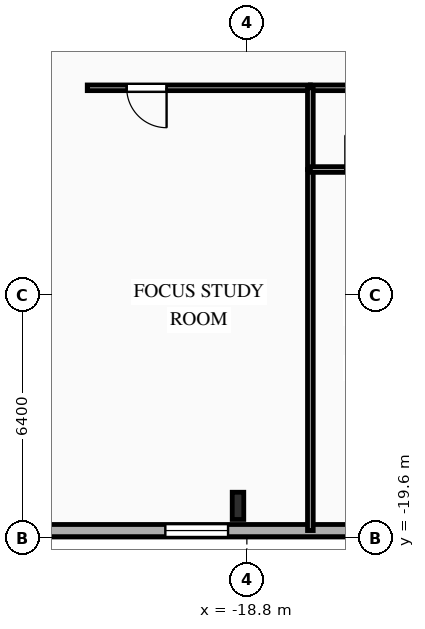
"""IFC4 building model, lengths in metres.
Left out: names, types, materials, properties, quantities, classifications, styles, units other than length and angle.
Written with IfcOpenShell. Run it as: python <this file> out.ifc"""

import sys

from ifc_helpers import new_model, si_unit, direction, frame, frame_2d, origin, origin_2d, place, context, subcontext, project, spatial, rectangle, i_section, extrude, element, fill, save


model = new_model("IFC4")
c1 = context("Model", 3, precision=1e-05, world=origin(), true_north=direction((0.0, 1.0)))
c2 = subcontext(c1, "Body", "Model", "MODEL_VIEW")
j1 = project(units=[si_unit("LENGTHUNIT", "METRE"), si_unit("PLANEANGLEUNIT", "RADIAN")], contexts=[c1])
p1 = place(None, origin())
s1 = spatial("IfcSite", under=j1, at=p1, CompositionType="ELEMENT")
p2 = place(p1, origin())
s2 = spatial("IfcBuilding", under=s1, at=p2, CompositionType="ELEMENT")
p3 = place(p2, frame((0.0, 0.0, 60.5)))
s3 = spatial("IfcBuildingStorey", under=s2, at=p3, CompositionType="ELEMENT", Elevation=60.5)
p4 = place(p3, frame((-19.033, -18.75, 0.0), z_axis=(0.0, 0.0, 1.0), x_axis=(1.0, 0.0, 0.0)))
e1 = element("IfcColumn", 1, at=p4, inside=s3, PredefinedType="COLUMN", context=c2, shape_type="SweptSolid", body=[
    extrude(i_section(OverallWidth=0.304, OverallDepth=0.716, WebThickness=0.021, FlangeThickness=0.04, FilletRadius=0.027, at=origin_2d()), origin(), (0.0, 0.0, 1.0), 3.35),
])
p5 = place(p3, frame((29.2, -19.4, 0.0), z_axis=(0.0, 0.0, 1.0), x_axis=(-1.0, 0.0, 0.0)))
e2 = element("IfcWall", 2, at=p5, inside=s3, PredefinedType="SOLIDWALL", context=c2, shape_type="SweptSolid", body=[
    extrude(rectangle(XDim=58.4, YDim=0.32, at=frame_2d((29.2, 0.0))), origin(), (0.0, 0.0, 1.0), 3.035),
])
p6 = place(p5, frame((7.215, 0.0, 0.85)))
e3 = element("IfcOpeningElement", 3, at=p6, cuts=e2, PredefinedType="OPENING", context=c2, shape_type="SweptSolid", body=[
    extrude(rectangle(XDim=1.65, YDim=1.85, at=frame_2d((0.825, 0.925))), frame((0.0, 0.17, 0.0), z_axis=(0.0, -1.0, 0.0), x_axis=(1.0, 0.0, 0.0)), (0.0, 0.0, 1.0), 0.34),
])
p7 = place(p5, frame((10.855, 0.0, 0.85)))
e4 = element("IfcOpeningElement", 4, at=p7, cuts=e2, PredefinedType="OPENING", context=c2, shape_type="SweptSolid", body=[
    extrude(rectangle(XDim=1.65, YDim=1.85, at=frame_2d((0.825, 0.925))), frame((0.0, 0.17, 0.0), z_axis=(0.0, -1.0, 0.0), x_axis=(1.0, 0.0, 0.0)), (0.0, 0.0, 1.0), 0.34),
])
p8 = place(p5, frame((15.7, 0.0, 0.85)))
e5 = element("IfcOpeningElement", 5, at=p8, cuts=e2, PredefinedType="OPENING", context=c2, shape_type="SweptSolid", body=[
    extrude(rectangle(XDim=2.2, YDim=1.85, at=frame_2d((1.1, 0.925))), frame((0.0, 0.17, 0.0), z_axis=(0.0, -1.0, 0.0), x_axis=(1.0, 0.0, 0.0)), (0.0, 0.0, 1.0), 0.34),
])
p9 = place(p5, frame((22.26, 0.0, 0.85)))
e6 = element("IfcOpeningElement", 6, at=p9, cuts=e2, PredefinedType="OPENING", context=c2, shape_type="SweptSolid", body=[
    extrude(rectangle(XDim=2.2, YDim=1.85, at=frame_2d((1.1, 0.925))), frame((0.0, 0.17, 0.0), z_axis=(0.0, -1.0, 0.0), x_axis=(1.0, 0.0, 0.0)), (0.0, 0.0, 1.0), 0.34),
])
p10 = place(p5, frame((29.408, 0.0, 0.85)))
e7 = element("IfcOpeningElement", 7, at=p10, cuts=e2, PredefinedType="OPENING", context=c2, shape_type="SweptSolid", body=[
    extrude(rectangle(XDim=2.2, YDim=1.85, at=frame_2d((1.1, 0.925))), frame((0.0, 0.17, 0.0), z_axis=(0.0, -1.0, 0.0), x_axis=(1.0, 0.0, 0.0)), (0.0, 0.0, 1.0), 0.34),
])
p11 = place(p5, frame((35.38, 0.0, 0.85)))
e8 = element("IfcOpeningElement", 8, at=p11, cuts=e2, PredefinedType="OPENING", context=c2, shape_type="SweptSolid", body=[
    extrude(rectangle(XDim=2.2, YDim=1.85, at=frame_2d((1.1, 0.925))), frame((0.0, 0.17, 0.0), z_axis=(0.0, -1.0, 0.0), x_axis=(1.0, 0.0, 0.0)), (0.0, 0.0, 1.0), 0.34),
])
p12 = place(p5, frame((41.98, 0.0, 0.85)))
e9 = element("IfcOpeningElement", 9, at=p12, cuts=e2, PredefinedType="OPENING", context=c2, shape_type="SweptSolid", body=[
    extrude(rectangle(XDim=2.2, YDim=1.85, at=frame_2d((1.1, 0.925))), frame((0.0, 0.17, 0.0), z_axis=(0.0, -1.0, 0.0), x_axis=(1.0, 0.0, 0.0)), (0.0, 0.0, 1.0), 0.34),
])
p13 = place(p5, frame((48.495, 0.0, 0.85)))
e10 = element("IfcOpeningElement", 10, at=p13, cuts=e2, PredefinedType="OPENING", context=c2, shape_type="SweptSolid", body=[
    extrude(rectangle(XDim=1.65, YDim=1.85, at=frame_2d((0.825, 0.925))), frame((0.0, 0.17, 0.0), z_axis=(0.0, -1.0, 0.0), x_axis=(1.0, 0.0, 0.0)), (0.0, 0.0, 1.0), 0.34),
])
p14 = place(p3, frame((-17.129, -7.75, 0.0), z_axis=(0.0, 0.0, 1.0), x_axis=(-1.0, 0.0, 0.0)))
e11 = element("IfcWall", 11, at=p14, inside=s3, PredefinedType="PARTITIONING", context=c2, shape_type="SweptSolid", body=[
    extrude(rectangle(XDim=5.871, YDim=0.15, at=frame_2d((2.936, 0.0))), origin(), (0.0, 0.0, 1.0), 3.035),
])
p15 = place(p14, frame((3.783, 0.0, 0.0)))
e12 = element("IfcOpeningElement", 12, at=p15, cuts=e11, PredefinedType="OPENING", context=c2, shape_type="SweptSolid", body=[
    extrude(rectangle(XDim=1.05, YDim=2.15, at=frame_2d((0.525, 1.075))), frame((0.0, 0.085, 0.0), z_axis=(0.0, -1.0, 0.0), x_axis=(1.0, 0.0, 0.0)), (0.0, 0.0, 1.0), 0.17),
])
p16 = place(p3, frame((-14.679, -7.75, 0.0), z_axis=(0.0, 0.0, 1.0), x_axis=(-1.0, 0.0, 0.0)))
e13 = element("IfcWall", 13, at=p16, inside=s3, PredefinedType="PLUMBINGWALL", context=c2, shape_type="SweptSolid", body=[
    extrude(rectangle(XDim=2.45, YDim=0.15, at=frame_2d((1.225, 0.0))), origin(), (0.0, 0.0, 1.0), 3.035),
])
p17 = place(p3, frame((-17.129, -9.9, 0.0), z_axis=(0.0, 0.0, 1.0), x_axis=(0.0, -1.0, 0.0)))
e14 = element("IfcWall", 14, at=p17, inside=s3, PredefinedType="PARTITIONING", context=c2, shape_type="SweptSolid", body=[
    extrude(rectangle(XDim=9.5, YDim=0.15, at=frame_2d((4.75, 0.0))), origin(), (0.0, 0.0, 1.0), 3.035),
])
p18 = place(p3, frame((-17.129, -7.75, 0.0), z_axis=(0.0, 0.0, 1.0), x_axis=(0.0, -1.0, 0.0)))
e15 = element("IfcWall", 15, at=p18, inside=s3, PredefinedType="PLUMBINGWALL", context=c2, shape_type="SweptSolid", body=[
    extrude(rectangle(XDim=2.15, YDim=0.15, at=frame_2d((1.075, 0.0))), origin(), (0.0, 0.0, 1.0), 3.035),
])
p19 = place(p3, frame((-17.129, -9.9, 0.0), z_axis=(0.0, 0.0, 1.0), x_axis=(1.0, 0.0, 0.0)))
e16 = element("IfcWall", 16, at=p19, inside=s3, PredefinedType="PLUMBINGWALL", context=c2, shape_type="SweptSolid", body=[
    extrude(rectangle(XDim=2.45, YDim=0.15, at=frame_2d((1.225, 0.0))), origin(), (0.0, 0.0, 1.0), 3.035),
])
p20 = place(p19, frame((0.921, 0.0, 0.0)))
e17 = element("IfcOpeningElement", 17, at=p20, cuts=e16, PredefinedType="OPENING", context=c2, shape_type="SweptSolid", body=[
    extrude(rectangle(XDim=0.9, YDim=2.1, at=frame_2d((0.45, 1.05))), frame((0.0, 0.085, 0.0), z_axis=(0.0, -1.0, 0.0), x_axis=(1.0, 0.0, 0.0)), (0.0, 0.0, 1.0), 0.17),
])
p21 = place(p13, origin())
e18 = element("IfcWindow", 18, at=p21, inside=s3, PartitioningType="SINGLE_PANEL", PredefinedType="WINDOW", context=c2, shape_type="SweptSolid", body=[
    extrude(rectangle(XDim=1.65, YDim=1.85, at=frame_2d((0.825, 0.925))), frame((0.0, 0.03, 0.0), z_axis=(0.0, -1.0, 0.0), x_axis=(1.0, 0.0, 0.0)), (0.0, 0.0, 1.0), 0.06),
])
fill(e10, e18)
p22 = place(p15, origin())
e19 = element("IfcDoor", 19, at=p22, inside=s3, OperationType="SINGLE_SWING_LEFT", PredefinedType="DOOR", context=c2, shape_type="SweptSolid", body=[
    extrude(rectangle(XDim=1.05, YDim=2.15, at=frame_2d((0.525, 1.075))), frame((0.0, 0.025, 0.0), z_axis=(0.0, -1.0, 0.0), x_axis=(1.0, 0.0, 0.0)), (0.0, 0.0, 1.0), 0.05),
])
fill(e12, e19)
p23 = place(p20, origin())
e20 = element("IfcDoor", 20, at=p23, inside=s3, OperationType="SINGLE_SWING_LEFT", PredefinedType="DOOR", context=c2, shape_type="SweptSolid", body=[
    extrude(rectangle(XDim=0.9, YDim=2.1, at=frame_2d((0.45, 1.05))), frame((0.0, 0.025, 0.0), z_axis=(0.0, -1.0, 0.0), x_axis=(1.0, 0.0, 0.0)), (0.0, 0.0, 1.0), 0.05),
])
fill(e17, e20)
save(model, sys.argv[1])
